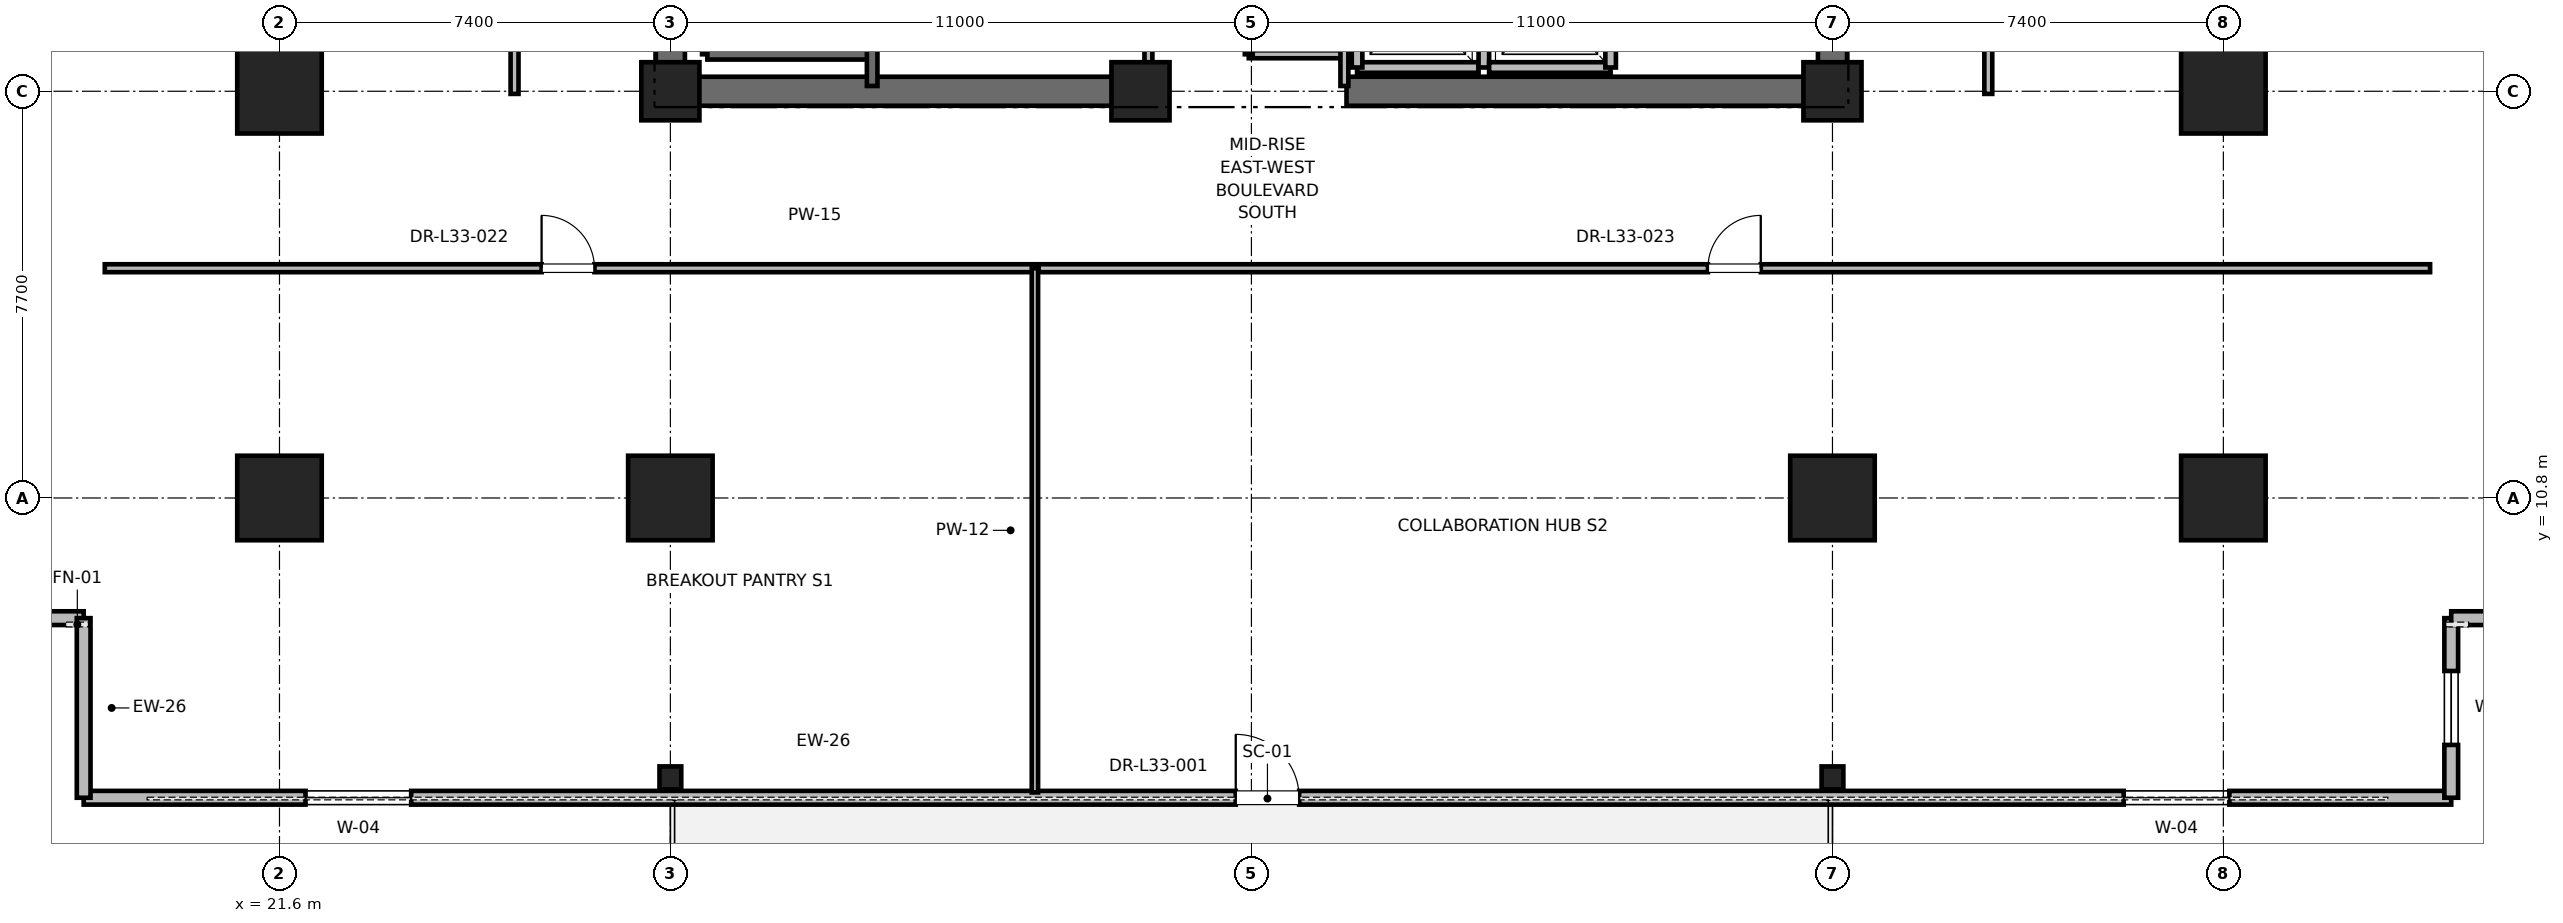
"""IFC4 building model, lengths in metres.
Left out: names, types, materials, properties, quantities, classifications, styles, units other than length and angle.
Written with IfcOpenShell. Run it as: python <this file> out.ifc"""

import sys

from ifc_helpers import new_model, si_unit, direction, frame, frame_2d, origin, origin_2d, place, context, subcontext, project, spatial, rectangle, i_section, extrude, element, fill, save


model = new_model("IFC4")
c1 = context("Model", 3, precision=1e-05, world=origin(), true_north=direction((0.0, 1.0)))
c2 = subcontext(c1, "Body", "Model", "MODEL_VIEW")
j1 = project(units=[si_unit("LENGTHUNIT", "METRE"), si_unit("PLANEANGLEUNIT", "RADIAN")], contexts=[c1])
p1 = place(None, origin())
s1 = spatial("IfcSite", under=j1, at=p1, CompositionType="ELEMENT")
p2 = place(p1, origin())
s2 = spatial("IfcBuilding", under=s1, at=p2, CompositionType="ELEMENT")
p3 = place(p2, frame((0.0, 0.0, 144.4)))
s3 = spatial("IfcBuildingStorey", under=s2, at=p3, CompositionType="ELEMENT", Elevation=144.4)
for number, where, z_axis, x_axis in (
    (1, (29.0, 10.8, 0.0), (0.0, 0.0, 1.0), (1.0, 0.0, 0.0)),
    (2, (51.0, 10.8, 0.0), (0.0, 0.0, 1.0), (1.0, 0.0, 0.0)),
    (3, (21.6, 18.5, 0.0), (0.0, 0.0, 1.0), (1.0, 0.0, 0.0)),
    (4, (58.4, 18.5, 0.0), (0.0, 0.0, 1.0), (1.0, 0.0, 0.0)),
    (5, (21.6, 10.8, 0.0), (0.0, 0.0, 1.0), (1.0, 0.0, 0.0)),
    (6, (58.4, 10.8, 0.0), (0.0, 0.0, 1.0), (1.0, 0.0, 0.0)),
):
    element("IfcColumn", number, at=place(p3, frame(where, z_axis=z_axis, x_axis=x_axis)), inside=s3, PredefinedType="COLUMN", context=c2, shape_type="SweptSolid", body=[
        extrude(rectangle(XDim=1.6, YDim=1.6, at=origin_2d()), origin(), (0.0, 0.0, 1.0), 4.0),
    ])
for number, where, z_axis, x_axis in (
    (7, (29.0, 5.5, 0.0), (0.0, 0.0, 1.0), (1.0, 0.0, 0.0)),
    (8, (51.0, 5.5, 0.0), (0.0, 0.0, 1.0), (1.0, 0.0, 0.0)),
):
    element("IfcColumn", number, at=place(p3, frame(where, z_axis=z_axis, x_axis=x_axis)), inside=s3, PredefinedType="COLUMN", context=c2, shape_type="SweptSolid", body=[
        extrude(i_section(OverallWidth=0.412, OverallDepth=0.437, WebThickness=0.036, FlangeThickness=0.058, FilletRadius=0.015, at=origin_2d()), origin(), (0.0, 0.0, 1.0), 4.0),
    ])
for number, where, z_axis, x_axis in (
    (9, (29.0, 18.5, 0.0), (0.0, 0.0, 1.0), (1.0, 0.0, 0.0)),
    (10, (51.0, 18.5, 0.0), (0.0, 0.0, 1.0), (1.0, 0.0, 0.0)),
    (11, (37.9, 18.5, 0.0), (0.0, 0.0, 1.0), (1.0, 0.0, 0.0)),
):
    element("IfcColumn", number, at=place(p3, frame(where, z_axis=z_axis, x_axis=x_axis)), inside=s3, PredefinedType="PILASTER", context=c2, shape_type="SweptSolid", body=[
        extrude(rectangle(XDim=1.1, YDim=1.1, at=origin_2d()), origin(), (0.0, 0.0, 1.0), 4.0),
    ])
for number, where, z_axis, x_axis in (
    (12, (29.0, 18.5, 0.0), (0.0, 0.0, 1.0), (1.0, 0.0, 0.0)),
    (13, (41.8, 18.5, 0.0), (0.0, 0.0, 1.0), (1.0, 0.0, 0.0)),
):
    element("IfcWall", number, at=place(p3, frame(where, z_axis=z_axis, x_axis=x_axis)), inside=s3, PredefinedType="SHEAR", context=c2, shape_type="SweptSolid", body=[
        extrude(rectangle(XDim=9.2, YDim=0.55, at=frame_2d((4.6, 0.0))), origin(), (0.0, 0.0, 1.0), 3.775),
    ])
p4 = place(p3, frame((29.0, 18.5, 0.0), z_axis=(0.0, 0.0, 1.0), x_axis=(0.0, 1.0, 0.0)))
e14 = element("IfcWall", 14, at=p4, inside=s3, PredefinedType="SHEAR", context=c2, shape_type="SweptSolid", body=[
    extrude(rectangle(XDim=8.8, YDim=0.55, at=frame_2d((4.4, 0.0))), origin(), (0.0, 0.0, 1.0), 3.775),
])
p5 = place(p3, frame((51.0, 18.5, 0.0), z_axis=(0.0, 0.0, 1.0), x_axis=(0.0, 1.0, 0.0)))
e15 = element("IfcWall", 15, at=p5, inside=s3, PredefinedType="SHEAR", context=c2, shape_type="SweptSolid", body=[
    extrude(rectangle(XDim=5.8, YDim=0.55, at=frame_2d((2.9, 0.0))), origin(), (0.0, 0.0, 1.0), 3.775),
])
p6 = place(p3, frame((17.893, 5.125, 0.0), z_axis=(0.0, 0.0, 1.0), x_axis=(1.0, 0.0, 0.0)))
e16 = element("IfcWall", 16, at=p6, inside=s3, PredefinedType="PARAPET", context=c2, shape_type="SweptSolid", body=[
    extrude(rectangle(XDim=44.821, YDim=0.26, at=frame_2d((22.411, 0.0))), origin(), (0.0, 0.0, 1.0), 2.97),
])
p7 = place(p6, frame((4.2, 0.0, 0.85)))
e17 = element("IfcOpeningElement", 17, at=p7, cuts=e16, PredefinedType="OPENING", context=c2, shape_type="SweptSolid", body=[
    extrude(rectangle(XDim=2.0, YDim=2.3, at=frame_2d((1.0, 1.15))), frame((0.0, 0.13, 0.0), z_axis=(0.0, -1.0, 0.0), x_axis=(1.0, 0.0, 0.0)), (0.0, 0.0, 1.0), 0.26),
])
p8 = place(p6, frame((21.811, 0.0, 0.0)))
e18 = element("IfcOpeningElement", 18, at=p8, cuts=e16, PredefinedType="OPENING", context=c2, shape_type="SweptSolid", body=[
    extrude(rectangle(XDim=1.2, YDim=2.2, at=frame_2d((0.6, 1.1))), frame((0.0, 0.13, 0.0), z_axis=(0.0, -1.0, 0.0), x_axis=(1.0, 0.0, 0.0)), (0.0, 0.0, 1.0), 0.26),
])
p9 = place(p6, frame((38.621, 0.0, 0.85)))
e19 = element("IfcOpeningElement", 19, at=p9, cuts=e16, PredefinedType="OPENING", context=c2, shape_type="SweptSolid", body=[
    extrude(rectangle(XDim=2.0, YDim=2.3, at=frame_2d((1.0, 1.15))), frame((0.0, 0.13, 0.0), z_axis=(0.0, -1.0, 0.0), x_axis=(1.0, 0.0, 0.0)), (0.0, 0.0, 1.0), 0.26),
])
p10 = place(p3, frame((14.093, 8.525, 0.0), z_axis=(0.0, 0.0, 1.0), x_axis=(1.0, 0.0, 0.0)))
e20 = element("IfcWall", 20, at=p10, inside=s3, PredefinedType="PARAPET", context=c2, shape_type="SweptSolid", body=[
    extrude(rectangle(XDim=3.8, YDim=0.26, at=frame_2d((1.9, 0.0))), origin(), (0.0, 0.0, 1.0), 3.775),
])
p11 = place(p10, frame((1.2, 0.0, 0.85)))
e21 = element("IfcOpeningElement", 21, at=p11, cuts=e20, PredefinedType="OPENING", context=c2, shape_type="SweptSolid", body=[
    extrude(rectangle(XDim=1.4, YDim=2.0, at=frame_2d((0.7, 1.0))), frame((0.0, 0.13, 0.0), z_axis=(0.0, -1.0, 0.0), x_axis=(1.0, 0.0, 0.0)), (0.0, 0.0, 1.0), 0.26),
])
p12 = place(p3, frame((17.893, 8.525, 0.0), z_axis=(0.0, 0.0, 1.0), x_axis=(0.0, -1.0, 0.0)))
e22 = element("IfcWall", 22, at=p12, inside=s3, PredefinedType="PARAPET", context=c2, shape_type="SweptSolid", body=[
    extrude(rectangle(XDim=3.4, YDim=0.26, at=frame_2d((1.7, 0.0))), origin(), (0.0, 0.0, 1.0), 3.775),
])
p13 = place(p3, frame((62.714, 5.125, 0.0), z_axis=(0.0, 0.0, 1.0), x_axis=(0.0, 1.0, 0.0)))
e23 = element("IfcWall", 23, at=p13, inside=s3, PredefinedType="PARAPET", context=c2, shape_type="SweptSolid", body=[
    extrude(rectangle(XDim=3.4, YDim=0.26, at=frame_2d((1.7, 0.0))), origin(), (0.0, 0.0, 1.0), 3.775),
])
p14 = place(p13, frame((1.0, 0.0, 0.85)))
e24 = element("IfcOpeningElement", 24, at=p14, cuts=e23, PredefinedType="OPENING", context=c2, shape_type="SweptSolid", body=[
    extrude(rectangle(XDim=1.4, YDim=2.0, at=frame_2d((0.7, 1.0))), frame((0.0, 0.13, 0.0), z_axis=(0.0, -1.0, 0.0), x_axis=(1.0, 0.0, 0.0)), (0.0, 0.0, 1.0), 0.26),
])
p15 = place(p3, frame((62.714, 8.525, 0.0), z_axis=(0.0, 0.0, 1.0), x_axis=(1.0, 0.0, 0.0)))
e25 = element("IfcWall", 25, at=p15, inside=s3, PredefinedType="PARAPET", context=c2, shape_type="SweptSolid", body=[
    extrude(rectangle(XDim=3.8, YDim=0.26, at=frame_2d((1.9, 0.0))), origin(), (0.0, 0.0, 1.0), 3.775),
])
p16 = place(p3, frame((29.7, 19.2, 0.0), z_axis=(0.0, 0.0, 1.0), x_axis=(0.0, 1.0, 0.0)))
e26 = element("IfcWall", 26, at=p16, inside=s3, PredefinedType="SOLIDWALL", context=c2, shape_type="SweptSolid", body=[
    extrude(rectangle(XDim=8.15, YDim=0.2, at=frame_2d((4.075, 0.0))), origin(), (0.0, 0.0, 1.0), 3.775),
])
p17 = place(p3, frame((29.7, 19.2, 0.0), z_axis=(0.0, 0.0, 1.0), x_axis=(1.0, 0.0, 0.0)))
e27 = element("IfcWall", 27, at=p17, inside=s3, PredefinedType="SOLIDWALL", context=c2, shape_type="SweptSolid", body=[
    extrude(rectangle(XDim=3.12, YDim=0.2, at=frame_2d((1.56, 0.0))), origin(), (0.0, 0.0, 1.0), 3.775),
])
p18 = place(p3, frame((32.82, 18.6, 0.0), z_axis=(0.0, 0.0, 1.0), x_axis=(0.0, 1.0, 0.0)))
e28 = element("IfcWall", 28, at=p18, inside=s3, PredefinedType="SOLIDWALL", context=c2, shape_type="SweptSolid", body=[
    extrude(rectangle(XDim=8.78, YDim=0.2, at=frame_2d((4.39, 0.0))), origin(), (0.0, 0.0, 1.0), 3.775),
])
p19 = place(p3, frame((42.0, 18.95, 0.0), z_axis=(0.0, 0.0, 1.0), x_axis=(1.0, 0.0, 0.0)))
e29 = element("IfcWall", 29, at=p19, inside=s3, PredefinedType="SOLIDWALL", context=c2, shape_type="SweptSolid", body=[
    extrude(rectangle(XDim=2.3, YDim=0.2, at=frame_2d((1.15, 0.0))), origin(), (0.0, 0.0, 1.0), 2.755),
])
p20 = place(p3, frame((42.0, 21.55, 0.0), z_axis=(0.0, 0.0, 1.0), x_axis=(0.0, -1.0, 0.0)))
e30 = element("IfcWall", 30, at=p20, inside=s3, PredefinedType="SOLIDWALL", context=c2, shape_type="SweptSolid", body=[
    extrude(rectangle(XDim=2.6, YDim=0.2, at=frame_2d((1.3, 0.0))), origin(), (0.0, 0.0, 1.0), 2.755),
])
p21 = place(p3, frame((44.4, 18.95, 0.0), z_axis=(0.0, 0.0, 1.0), x_axis=(0.0, 1.0, 0.0)))
e31 = element("IfcWall", 31, at=p21, inside=s3, PredefinedType="SOLIDWALL", context=c2, shape_type="SweptSolid", body=[
    extrude(rectangle(XDim=2.6, YDim=0.2, at=frame_2d((1.3, 0.0))), origin(), (0.0, 0.0, 1.0), 3.775),
])
p22 = place(p3, frame((44.5, 18.95, 0.0), z_axis=(0.0, 0.0, 1.0), x_axis=(1.0, 0.0, 0.0)))
e32 = element("IfcWall", 32, at=p22, inside=s3, PredefinedType="SOLIDWALL", context=c2, shape_type="SweptSolid", body=[
    extrude(rectangle(XDim=2.3, YDim=0.2, at=frame_2d((1.15, 0.0))), origin(), (0.0, 0.0, 1.0), 3.775),
])
p23 = place(p3, frame((46.8, 18.95, 0.0), z_axis=(0.0, 0.0, 1.0), x_axis=(0.0, 1.0, 0.0)))
e33 = element("IfcWall", 33, at=p23, inside=s3, PredefinedType="SOLIDWALL", context=c2, shape_type="SweptSolid", body=[
    extrude(rectangle(XDim=2.6, YDim=0.2, at=frame_2d((1.3, 0.0))), origin(), (0.0, 0.0, 1.0), 3.775),
])
p24 = place(p3, frame((39.95, 19.2, 0.0), z_axis=(0.0, 0.0, 1.0), x_axis=(1.0, 0.0, 0.0)))
e34 = element("IfcWall", 34, at=p24, inside=s3, PredefinedType="PARTITIONING", context=c2, shape_type="SweptSolid", body=[
    extrude(rectangle(XDim=1.81, YDim=0.15, at=frame_2d((0.905, 0.0))), origin(), (0.0, 0.0, 1.0), 2.85),
])
p25 = place(p3, frame((41.76, 18.6, 0.0), z_axis=(0.0, 0.0, 1.0), x_axis=(0.0, 1.0, 0.0)))
e35 = element("IfcWall", 35, at=p25, inside=s3, PredefinedType="PARTITIONING", context=c2, shape_type="SweptSolid", body=[
    extrude(rectangle(XDim=3.6, YDim=0.15, at=frame_2d((1.8, 0.0))), origin(), (0.0, 0.0, 1.0), 2.755),
])
p26 = place(p3, frame((39.95, 19.2, 0.0), z_axis=(0.0, 0.0, 1.0), x_axis=(0.0, 1.0, 0.0)))
e36 = element("IfcWall", 36, at=p26, inside=s3, PredefinedType="PARTITIONING", context=c2, shape_type="SweptSolid", body=[
    extrude(rectangle(XDim=3.0, YDim=0.15, at=frame_2d((1.5, 0.0))), origin(), (0.0, 0.0, 1.0), 2.85),
])
p27 = place(p26, frame((1.05, 0.0, 0.0)))
e37 = element("IfcOpeningElement", 37, at=p27, cuts=e36, PredefinedType="OPENING", context=c2, shape_type="SweptSolid", body=[
    extrude(rectangle(XDim=0.9, YDim=2.1, at=frame_2d((0.45, 1.05))), frame((0.0, 0.075, 0.0), z_axis=(0.0, -1.0, 0.0), x_axis=(1.0, 0.0, 0.0)), (0.0, 0.0, 1.0), 0.15),
])
p28 = place(p3, frame((38.05, 18.6, 0.0), z_axis=(0.0, 0.0, 1.0), x_axis=(0.0, 1.0, 0.0)))
e38 = element("IfcWall", 38, at=p28, inside=s3, PredefinedType="PARTITIONING", context=c2, shape_type="SweptSolid", body=[
    extrude(rectangle(XDim=4.46, YDim=0.15, at=frame_2d((2.23, 0.0))), origin(), (0.0, 0.0, 1.0), 2.755),
])
p29 = place(p28, frame((1.73, 0.0, 0.0)))
e39 = element("IfcOpeningElement", 39, at=p29, cuts=e38, PredefinedType="OPENING", context=c2, shape_type="SweptSolid", body=[
    extrude(rectangle(XDim=1.0, YDim=2.15, at=frame_2d((0.5, 1.075))), frame((0.0, 0.075, 0.0), z_axis=(0.0, -1.0, 0.0), x_axis=(1.0, 0.0, 0.0)), (0.0, 0.0, 1.0), 0.15),
])
p30 = place(p3, frame((18.293, 15.15, 0.0), z_axis=(0.0, 0.0, 1.0), x_axis=(1.0, 0.0, 0.0)))
e40 = element("IfcWall", 40, at=p30, inside=s3, PredefinedType="PARTITIONING", context=c2, shape_type="SweptSolid", body=[
    extrude(rectangle(XDim=17.608, YDim=0.15, at=frame_2d((8.804, 0.0))), origin(), (0.0, 0.0, 1.0), 2.85),
])
p31 = place(p30, frame((8.269, 0.0, 0.0)))
e41 = element("IfcOpeningElement", 41, at=p31, cuts=e40, PredefinedType="OPENING", context=c2, shape_type="SweptSolid", body=[
    extrude(rectangle(XDim=1.0, YDim=2.15, at=frame_2d((0.5, 1.075))), frame((0.0, 0.075, 0.0), z_axis=(0.0, -1.0, 0.0), x_axis=(1.0, 0.0, 0.0)), (0.0, 0.0, 1.0), 0.15),
])
p32 = place(p3, frame((35.901, 5.225, 0.0), z_axis=(0.0, 0.0, 1.0), x_axis=(0.0, 1.0, 0.0)))
e42 = element("IfcWall", 42, at=p32, inside=s3, PredefinedType="PARTITIONING", context=c2, shape_type="SweptSolid", body=[
    extrude(rectangle(XDim=9.925, YDim=0.12, at=frame_2d((4.962, 0.0))), origin(), (0.0, 0.0, 1.0), 2.405),
])
p33 = place(p3, frame((35.971, 15.15, 0.0), z_axis=(0.0, 0.0, 1.0), x_axis=(1.0, 0.0, 0.0)))
e43 = element("IfcWall", 43, at=p33, inside=s3, PredefinedType="PARTITIONING", context=c2, shape_type="SweptSolid", body=[
    extrude(rectangle(XDim=26.343, YDim=0.15, at=frame_2d((13.171, 0.0))), origin(), (0.0, 0.0, 1.0), 2.85),
])
p34 = place(p33, frame((12.671, 0.0, 0.0)))
e44 = element("IfcOpeningElement", 44, at=p34, cuts=e43, PredefinedType="OPENING", context=c2, shape_type="SweptSolid", body=[
    extrude(rectangle(XDim=1.0, YDim=2.15, at=frame_2d((0.5, 1.075))), frame((0.0, 0.075, 0.0), z_axis=(0.0, -1.0, 0.0), x_axis=(1.0, 0.0, 0.0)), (0.0, 0.0, 1.0), 0.15),
])
p35 = place(p3, frame((26.05, 18.45, 0.0), z_axis=(0.0, 0.0, 1.0), x_axis=(0.0, 1.0, 0.0)))
e45 = element("IfcWall", 45, at=p35, inside=s3, PredefinedType="PARTITIONING", context=c2, shape_type="SweptSolid", body=[
    extrude(rectangle(XDim=18.1, YDim=0.15, at=frame_2d((9.05, 0.0))), origin(), (0.0, 0.0, 1.0), 2.85),
])
p36 = place(p35, frame((8.55, 0.0, 0.0)))
e46 = element("IfcOpeningElement", 46, at=p36, cuts=e45, PredefinedType="OPENING", context=c2, shape_type="SweptSolid", body=[
    extrude(rectangle(XDim=1.0, YDim=2.15, at=frame_2d((0.5, 1.075))), frame((0.0, 0.075, 0.0), z_axis=(0.0, -1.0, 0.0), x_axis=(1.0, 0.0, 0.0)), (0.0, 0.0, 1.0), 0.15),
])
p37 = place(p3, frame((53.95, 18.45, 0.0), z_axis=(0.0, 0.0, 1.0), x_axis=(0.0, 1.0, 0.0)))
e47 = element("IfcWall", 47, at=p37, inside=s3, PredefinedType="PARTITIONING", context=c2, shape_type="SweptSolid", body=[
    extrude(rectangle(XDim=6.154, YDim=0.15, at=frame_2d((3.077, 0.0))), origin(), (0.0, 0.0, 1.0), 2.85),
])
p38 = place(p37, frame((2.617, 0.0, 0.0)))
e48 = element("IfcOpeningElement", 48, at=p38, cuts=e47, PredefinedType="OPENING", context=c2, shape_type="SweptSolid", body=[
    extrude(rectangle(XDim=1.0, YDim=2.15, at=frame_2d((0.5, 1.075))), frame((0.0, 0.075, 0.0), z_axis=(0.0, -1.0, 0.0), x_axis=(1.0, 0.0, 0.0)), (0.0, 0.0, 1.0), 0.15),
])
p39 = place(p7, origin())
e49 = element("IfcWindow", 49, at=p39, inside=s3, PartitioningType="SINGLE_PANEL", PredefinedType="WINDOW", context=c2, shape_type="SweptSolid", body=[
    extrude(rectangle(XDim=2.0, YDim=2.3, at=frame_2d((1.0, 1.15))), frame((0.0, 0.03, 0.0), z_axis=(0.0, -1.0, 0.0), x_axis=(1.0, 0.0, 0.0)), (0.0, 0.0, 1.0), 0.06),
])
fill(e17, e49)
p40 = place(p8, origin())
e50 = element("IfcDoor", 50, at=p40, inside=s3, OperationType="SINGLE_SWING_LEFT", PredefinedType="DOOR", context=c2, shape_type="SweptSolid", body=[
    extrude(rectangle(XDim=1.2, YDim=2.2, at=frame_2d((0.6, 1.1))), frame((0.0, 0.025, 0.0), z_axis=(0.0, -1.0, 0.0), x_axis=(1.0, 0.0, 0.0)), (0.0, 0.0, 1.0), 0.05),
])
fill(e18, e50)
p41 = place(p9, origin())
e51 = element("IfcWindow", 51, at=p41, inside=s3, PartitioningType="SINGLE_PANEL", PredefinedType="WINDOW", context=c2, shape_type="SweptSolid", body=[
    extrude(rectangle(XDim=2.0, YDim=2.3, at=frame_2d((1.0, 1.15))), frame((0.0, 0.03, 0.0), z_axis=(0.0, -1.0, 0.0), x_axis=(1.0, 0.0, 0.0)), (0.0, 0.0, 1.0), 0.06),
])
fill(e19, e51)
p42 = place(p14, origin())
e52 = element("IfcWindow", 52, at=p42, inside=s3, PartitioningType="SINGLE_PANEL", PredefinedType="WINDOW", context=c2, shape_type="SweptSolid", body=[
    extrude(rectangle(XDim=1.4, YDim=2.0, at=frame_2d((0.7, 1.0))), frame((0.0, 0.03, 0.0), z_axis=(0.0, -1.0, 0.0), x_axis=(1.0, 0.0, 0.0)), (0.0, 0.0, 1.0), 0.06),
])
fill(e24, e52)
p43 = place(p31, origin())
e53 = element("IfcDoor", 53, at=p43, inside=s3, OperationType="SINGLE_SWING_LEFT", PredefinedType="DOOR", context=c2, shape_type="SweptSolid", body=[
    extrude(rectangle(XDim=1.0, YDim=2.15, at=frame_2d((0.5, 1.075))), frame((0.0, 0.025, 0.0), z_axis=(0.0, -1.0, 0.0), x_axis=(1.0, 0.0, 0.0)), (0.0, 0.0, 1.0), 0.05),
])
fill(e41, e53)
p44 = place(p34, origin())
e54 = element("IfcDoor", 54, at=p44, inside=s3, OperationType="SINGLE_SWING_RIGHT", PredefinedType="DOOR", context=c2, shape_type="SweptSolid", body=[
    extrude(rectangle(XDim=1.0, YDim=2.15, at=frame_2d((0.5, 1.075))), frame((0.0, 0.025, 0.0), z_axis=(0.0, -1.0, 0.0), x_axis=(1.0, 0.0, 0.0)), (0.0, 0.0, 1.0), 0.05),
])
fill(e44, e54)
save(model, sys.argv[1])
